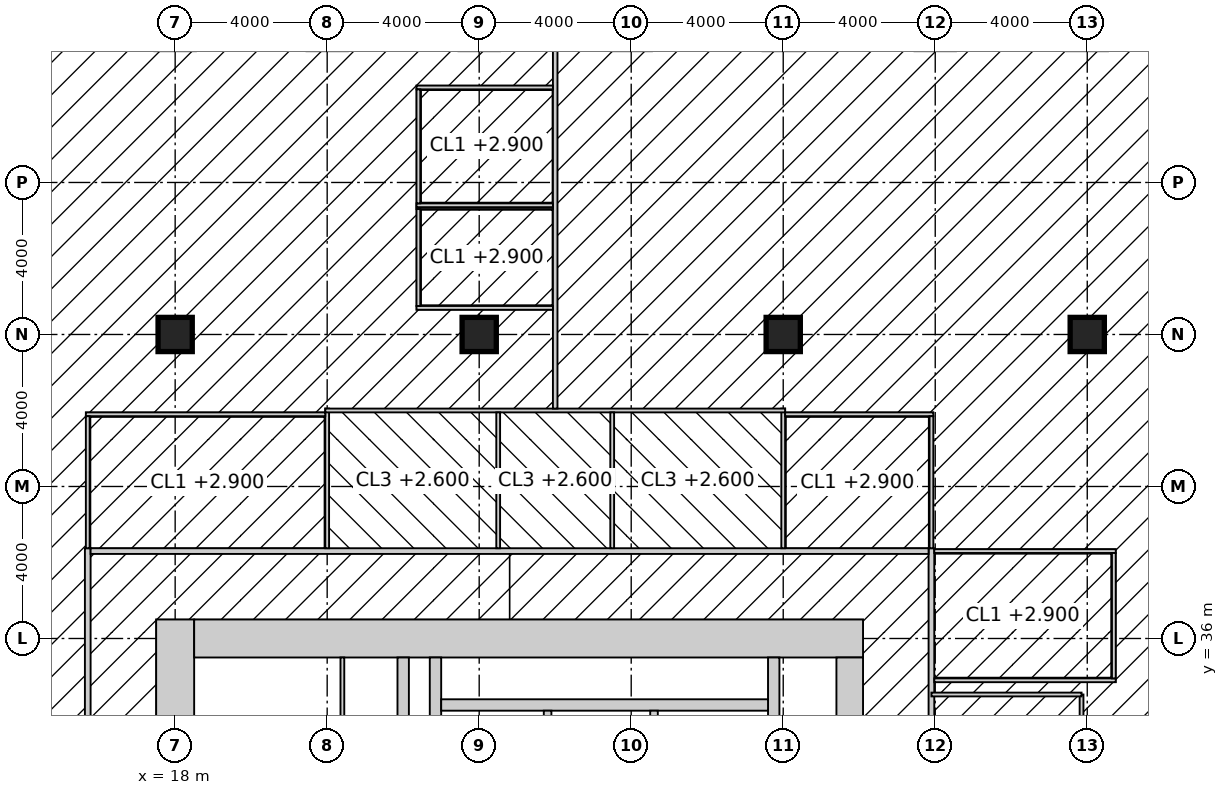
"""IFC4 building model, lengths in metres.
Left out: names, types, materials, properties, quantities, classifications, styles, units other than length and angle.
Written with IfcOpenShell. Run it as: python <this file> out.ifc"""

import sys

from ifc_helpers import new_model, si_unit, direction, frame, frame_2d, origin, origin_2d, place, context, subcontext, project, spatial, rectangle, hollow_rectangle, extrude, element, fill, save


model = new_model("IFC4")
c1 = context("Model", 3, precision=1e-05, world=origin(), true_north=direction((0.0, 1.0)))
c2 = subcontext(c1, "Body", "Model", "MODEL_VIEW")
j1 = project(units=[si_unit("LENGTHUNIT", "METRE"), si_unit("PLANEANGLEUNIT", "RADIAN")], contexts=[c1])
p1 = place(None, origin())
s1 = spatial("IfcSite", under=j1, at=p1, CompositionType="ELEMENT")
p2 = place(p1, origin())
s2 = spatial("IfcBuilding", under=s1, at=p2, CompositionType="ELEMENT")
p3 = place(p2, frame((0.0, 0.0, 121.4)))
s3 = spatial("IfcBuildingStorey", under=s2, at=p3, CompositionType="ELEMENT", Elevation=121.4)
for number, where, z_axis, x_axis in (
    (1, (18.0, 44.0, 0.0), (0.0, 0.0, 1.0), (1.0, 0.0, 0.0)),
    (2, (26.0, 44.0, 0.0), (0.0, 0.0, 1.0), (1.0, 0.0, 0.0)),
    (3, (34.0, 44.0, 0.0), (0.0, 0.0, 1.0), (1.0, 0.0, 0.0)),
    (4, (42.0, 44.0, 0.0), (0.0, 0.0, 1.0), (1.0, 0.0, 0.0)),
):
    element("IfcColumn", number, at=place(p3, frame(where, z_axis=z_axis, x_axis=x_axis)), inside=s3, PredefinedType="COLUMN", context=c2, shape_type="SweptSolid", body=[
        extrude(hollow_rectangle(XDim=0.9, YDim=0.9, WallThickness=0.1, at=origin_2d()), origin(), (0.0, 0.0, 1.0), 4.0),
    ])
p4 = place(p3, frame((18.0, 17.5, -0.15), z_axis=(0.0, 0.0, 1.0), x_axis=(0.0, 1.0, 0.0)))
e5 = element("IfcWall", 5, at=p4, inside=s3, PredefinedType="SHEAR", context=c2, shape_type="SweptSolid", body=[
    extrude(rectangle(XDim=19.0, YDim=1.0, at=frame_2d((9.5, 0.0))), origin(), (0.0, 0.0, 1.0), 4.0),
])
p5 = place(p3, frame((18.5, 36.0, -0.15), z_axis=(0.0, 0.0, 1.0), x_axis=(1.0, 0.0, 0.0)))
e6 = element("IfcWall", 6, at=p5, inside=s3, PredefinedType="SHEAR", context=c2, shape_type="SweptSolid", body=[
    extrude(rectangle(XDim=17.6, YDim=1.0, at=frame_2d((8.8, 0.0))), origin(), (0.0, 0.0, 1.0), 4.0),
])
p6 = place(p3, frame((35.75, 18.5, -0.15), z_axis=(0.0, 0.0, 1.0), x_axis=(0.0, 1.0, 0.0)))
e7 = element("IfcWall", 7, at=p6, inside=s3, PredefinedType="SHEAR", context=c2, shape_type="SweptSolid", body=[
    extrude(rectangle(XDim=17.0, YDim=0.7, at=frame_2d((8.5, 0.0))), origin(), (0.0, 0.0, 1.0), 4.0),
])
p7 = place(p6, frame((9.85, 0.0, 0.15)))
e8 = element("IfcOpeningElement", 8, at=p7, cuts=e7, PredefinedType="OPENING", context=c2, shape_type="SweptSolid", body=[
    extrude(rectangle(XDim=1.0, YDim=2.2, at=frame_2d((0.5, 1.1))), frame((0.0, 0.36, 0.0), z_axis=(0.0, -1.0, 0.0), x_axis=(1.0, 0.0, 0.0)), (0.0, 0.0, 1.0), 0.72),
])
p8 = place(p3, frame((24.0, 18.5, -0.15), z_axis=(0.0, 0.0, 1.0), x_axis=(0.0, 1.0, 0.0)))
e9 = element("IfcWall", 9, at=p8, inside=s3, PredefinedType="SHEAR", context=c2, shape_type="SweptSolid", body=[
    extrude(rectangle(XDim=17.0, YDim=0.3, at=frame_2d((8.5, 0.0))), origin(), (0.0, 0.0, 1.0), 4.0),
])
p9 = place(p8, frame((9.6, 0.0, 0.15)))
e10 = element("IfcOpeningElement", 10, at=p9, cuts=e9, PredefinedType="OPENING", context=c2, shape_type="SweptSolid", body=[
    extrude(rectangle(XDim=1.5, YDim=2.4, at=frame_2d((0.75, 1.2))), frame((0.0, 0.16, 0.0), z_axis=(0.0, -1.0, 0.0), x_axis=(1.0, 0.0, 0.0)), (0.0, 0.0, 1.0), 0.32),
])
for number, where, z_axis, x_axis in (
    (11, (24.85, 31.3, -0.15), (0.0, 0.0, 1.0), (0.0, 1.0, 0.0)),
    (12, (33.75, 31.3, -0.15), (0.0, 0.0, 1.0), (0.0, 1.0, 0.0)),
):
    element("IfcWall", number, at=place(p3, frame(where, z_axis=z_axis, x_axis=x_axis)), inside=s3, PredefinedType="SHEAR", context=c2, shape_type="SweptSolid", body=[
        extrude(rectangle(XDim=4.2, YDim=0.3, at=frame_2d((2.1, 0.0))), origin(), (0.0, 0.0, 1.0), 4.0),
    ])
p10 = place(p3, frame((25.0, 34.25, -0.15), z_axis=(0.0, 0.0, 1.0), x_axis=(1.0, 0.0, 0.0)))
e13 = element("IfcWall", 13, at=p10, inside=s3, PredefinedType="SHEAR", context=c2, shape_type="SweptSolid", body=[
    extrude(rectangle(XDim=8.6, YDim=0.3, at=frame_2d((4.3, 0.0))), origin(), (0.0, 0.0, 1.0), 4.0),
])
for number, where, z_axis, x_axis in (
    (14, (27.8, 31.3, -0.15), (0.0, 0.0, 1.0), (0.0, 1.0, 0.0)),
    (15, (30.6, 31.3, -0.15), (0.0, 0.0, 1.0), (0.0, 1.0, 0.0)),
):
    element("IfcWall", number, at=place(p3, frame(where, z_axis=z_axis, x_axis=x_axis)), inside=s3, PredefinedType="SOLIDWALL", context=c2, shape_type="SweptSolid", body=[
        extrude(rectangle(XDim=2.8, YDim=0.2, at=frame_2d((1.4, 0.0))), origin(), (0.0, 0.0, 1.0), 4.0),
    ])
p11 = place(p3, frame((22.4, 31.3, 0.0), z_axis=(0.0, 0.0, 1.0), x_axis=(0.0, 1.0, 0.0)))
e16 = element("IfcWall", 16, at=p11, inside=s3, PredefinedType="PARTITIONING", context=c2, shape_type="SweptSolid", body=[
    extrude(rectangle(XDim=4.2, YDim=0.1, at=frame_2d((2.1, 0.0))), origin(), (0.0, 0.0, 1.0), 3.85),
])
p12 = place(p11, frame((1.55, 0.0, 0.0)))
e17 = element("IfcOpeningElement", 17, at=p12, cuts=e16, PredefinedType="OPENING", context=c2, shape_type="SweptSolid", body=[
    extrude(rectangle(XDim=1.0, YDim=2.2, at=frame_2d((0.5, 1.1))), frame((0.0, 0.06, 0.0), z_axis=(0.0, -1.0, 0.0), x_axis=(1.0, 0.0, 0.0)), (0.0, 0.0, 1.0), 0.12),
])
p13 = place(p3, frame((15.7, 15.625, 0.0), z_axis=(0.0, 0.0, 1.0), x_axis=(0.0, 1.0, 0.0)))
e18 = element("IfcWall", 18, at=p13, inside=s3, PredefinedType="PARTITIONING", context=c2, shape_type="SweptSolid", body=[
    extrude(rectangle(XDim=22.75, YDim=0.15, at=frame_2d((11.375, 0.0))), origin(), (0.0, 0.0, 1.0), 3.85),
])
p14 = place(p13, frame((4.974, 0.0, 0.0)))
e19 = element("IfcOpeningElement", 19, at=p14, cuts=e18, PredefinedType="OPENING", context=c2, shape_type="SweptSolid", body=[
    extrude(rectangle(XDim=1.8, YDim=2.4, at=frame_2d((0.9, 1.2))), frame((0.0, 0.085, 0.0), z_axis=(0.0, -1.0, 0.0), x_axis=(1.0, 0.0, 0.0)), (0.0, 0.0, 1.0), 0.17),
])
p15 = place(p13, frame((16.226, 0.0, 0.0)))
e20 = element("IfcOpeningElement", 20, at=p15, cuts=e18, PredefinedType="OPENING", context=c2, shape_type="SweptSolid", body=[
    extrude(rectangle(XDim=1.8, YDim=2.4, at=frame_2d((0.9, 1.2))), frame((0.0, 0.085, 0.0), z_axis=(0.0, -1.0, 0.0), x_axis=(1.0, 0.0, 0.0)), (0.0, 0.0, 1.0), 0.17),
])
p16 = place(p3, frame((37.9, 15.625, 0.0), z_axis=(0.0, 0.0, 1.0), x_axis=(0.0, 1.0, 0.0)))
e21 = element("IfcWall", 21, at=p16, inside=s3, PredefinedType="PARTITIONING", context=c2, shape_type="SweptSolid", body=[
    extrude(rectangle(XDim=22.75, YDim=0.15, at=frame_2d((11.375, 0.0))), origin(), (0.0, 0.0, 1.0), 2.95),
])
p17 = place(p16, frame((4.974, 0.0, 0.0)))
e22 = element("IfcOpeningElement", 22, at=p17, cuts=e21, PredefinedType="OPENING", context=c2, shape_type="SweptSolid", body=[
    extrude(rectangle(XDim=1.8, YDim=2.4, at=frame_2d((0.9, 1.2))), frame((0.0, 0.085, 0.0), z_axis=(0.0, -1.0, 0.0), x_axis=(1.0, 0.0, 0.0)), (0.0, 0.0, 1.0), 0.17),
])
p18 = place(p16, frame((16.226, 0.0, 0.0)))
e23 = element("IfcOpeningElement", 23, at=p18, cuts=e21, PredefinedType="OPENING", context=c2, shape_type="SweptSolid", body=[
    extrude(rectangle(XDim=1.8, YDim=2.4, at=frame_2d((0.9, 1.2))), frame((0.0, 0.085, 0.0), z_axis=(0.0, -1.0, 0.0), x_axis=(1.0, 0.0, 0.0)), (0.0, 0.0, 1.0), 0.17),
])
p19 = place(p3, frame((15.775, 38.3, 0.0), z_axis=(0.0, 0.0, 1.0), x_axis=(1.0, 0.0, 0.0)))
e24 = element("IfcWall", 24, at=p19, inside=s3, PredefinedType="PARTITIONING", context=c2, shape_type="SweptSolid", body=[
    extrude(rectangle(XDim=22.05, YDim=0.15, at=frame_2d((11.025, 0.0))), origin(), (0.0, 0.0, 1.0), 3.85),
])
p20 = place(p19, frame((7.975, 0.0, 0.0)))
e25 = element("IfcOpeningElement", 25, at=p20, cuts=e24, PredefinedType="OPENING", context=c2, shape_type="SweptSolid", body=[
    extrude(rectangle(XDim=0.9, YDim=2.1, at=frame_2d((0.45, 1.05))), frame((0.0, 0.085, 0.0), z_axis=(0.0, -1.0, 0.0), x_axis=(1.0, 0.0, 0.0)), (0.0, 0.0, 1.0), 0.17),
])
p21 = place(p19, frame((11.725, 0.0, 0.0)))
e26 = element("IfcOpeningElement", 26, at=p21, cuts=e24, PredefinedType="OPENING", context=c2, shape_type="SweptSolid", body=[
    extrude(rectangle(XDim=1.0, YDim=2.1, at=frame_2d((0.5, 1.05))), frame((0.0, 0.085, 0.0), z_axis=(0.0, -1.0, 0.0), x_axis=(1.0, 0.0, 0.0)), (0.0, 0.0, 1.0), 0.17),
])
p22 = place(p19, frame((15.575, 0.0, 0.0)))
e27 = element("IfcOpeningElement", 27, at=p22, cuts=e24, PredefinedType="OPENING", context=c2, shape_type="SweptSolid", body=[
    extrude(rectangle(XDim=0.9, YDim=2.1, at=frame_2d((0.45, 1.05))), frame((0.0, 0.085, 0.0), z_axis=(0.0, -1.0, 0.0), x_axis=(1.0, 0.0, 0.0)), (0.0, 0.0, 1.0), 0.17),
])
for number, where, z_axis, x_axis in (
    (28, (22.0, 38.375, 0.0), (0.0, 0.0, 1.0), (0.0, 1.0, 0.0)),
    (29, (34.0, 38.375, 0.0), (0.0, 0.0, 1.0), (0.0, 1.0, 0.0)),
):
    element("IfcWall", number, at=place(p3, frame(where, z_axis=z_axis, x_axis=x_axis)), inside=s3, PredefinedType="PARTITIONING", context=c2, shape_type="SweptSolid", body=[
        extrude(rectangle(XDim=3.675, YDim=0.1, at=frame_2d((1.837, 0.0))), origin(), (0.0, 0.0, 1.0), 2.95),
    ])
p23 = place(p3, frame((21.95, 42.0, 0.0), z_axis=(0.0, 0.0, 1.0), x_axis=(1.0, 0.0, 0.0)))
e30 = element("IfcWall", 30, at=p23, inside=s3, PredefinedType="PARTITIONING", context=c2, shape_type="SweptSolid", body=[
    extrude(rectangle(XDim=12.1, YDim=0.1, at=frame_2d((6.05, 0.0))), origin(), (0.0, 0.0, 1.0), 3.85),
])
for number, where, z_axis, x_axis in (
    (31, (26.5, 38.375, 0.0), (0.0, 0.0, 1.0), (0.0, 1.0, 0.0)),
    (32, (29.5, 38.375, 0.0), (0.0, 0.0, 1.0), (0.0, 1.0, 0.0)),
):
    element("IfcWall", number, at=place(p3, frame(where, z_axis=z_axis, x_axis=x_axis)), inside=s3, PredefinedType="PARTITIONING", context=c2, shape_type="SweptSolid", body=[
        extrude(rectangle(XDim=3.575, YDim=0.1, at=frame_2d((1.788, 0.0))), origin(), (0.0, 0.0, 1.0), 3.85),
    ])
p24 = place(p3, frame((28.0, 42.05, 0.0), z_axis=(0.0, 0.0, 1.0), x_axis=(0.0, 1.0, 0.0)))
e33 = element("IfcWall", 33, at=p24, inside=s3, PredefinedType="PARTITIONING", context=c2, shape_type="SweptSolid", body=[
    extrude(rectangle(XDim=9.65, YDim=0.12, at=frame_2d((4.825, 0.0))), origin(), (0.0, 0.0, 1.0), 3.85),
])
for number, where, z_axis, x_axis in (
    (34, (37.975, 34.9, 0.0), (0.0, 0.0, 1.0), (1.0, 0.0, 0.0)),
    (35, (37.975, 38.3, 0.0), (0.0, 0.0, 1.0), (1.0, 0.0, 0.0)),
):
    element("IfcWall", number, at=place(p3, frame(where, z_axis=z_axis, x_axis=x_axis)), inside=s3, PredefinedType="PARTITIONING", context=c2, shape_type="SweptSolid", body=[
        extrude(rectangle(XDim=4.775, YDim=0.1, at=frame_2d((2.387, 0.0))), origin(), (0.0, 0.0, 1.0), 3.85),
    ])
p25 = place(p3, frame((15.65, 41.9, 0.0), z_axis=(0.0, 0.0, 1.0), x_axis=(1.0, 0.0, 0.0)))
e36 = element("IfcWall", 36, at=p25, inside=s3, PredefinedType="PARTITIONING", context=c2, shape_type="SweptSolid", body=[
    extrude(rectangle(XDim=6.3, YDim=0.1, at=frame_2d((3.15, 0.0))), origin(), (0.0, 0.0, 1.0), 3.85),
])
p26 = place(p25, frame((2.7, 0.0, 0.0)))
e37 = element("IfcOpeningElement", 37, at=p26, cuts=e36, PredefinedType="OPENING", context=c2, shape_type="SweptSolid", body=[
    extrude(rectangle(XDim=1.0, YDim=2.2, at=frame_2d((0.5, 1.1))), frame((0.0, 0.06, 0.0), z_axis=(0.0, -1.0, 0.0), x_axis=(1.0, 0.0, 0.0)), (0.0, 0.0, 1.0), 0.12),
])
p27 = place(p3, frame((34.05, 41.9, 0.0), z_axis=(0.0, 0.0, 1.0), x_axis=(1.0, 0.0, 0.0)))
e38 = element("IfcWall", 38, at=p27, inside=s3, PredefinedType="PARTITIONING", context=c2, shape_type="SweptSolid", body=[
    extrude(rectangle(XDim=3.9, YDim=0.1, at=frame_2d((1.95, 0.0))), origin(), (0.0, 0.0, 1.0), 3.85),
])
p28 = place(p27, frame((1.4, 0.0, 0.0)))
e39 = element("IfcOpeningElement", 39, at=p28, cuts=e38, PredefinedType="OPENING", context=c2, shape_type="SweptSolid", body=[
    extrude(rectangle(XDim=1.0, YDim=2.2, at=frame_2d((0.5, 1.1))), frame((0.0, 0.06, 0.0), z_axis=(0.0, -1.0, 0.0), x_axis=(1.0, 0.0, 0.0)), (0.0, 0.0, 1.0), 0.12),
])
for number, where, z_axis, x_axis in (
    (40, (24.35, 44.7, 0.0), (0.0, 0.0, 1.0), (1.0, 0.0, 0.0)),
    (41, (24.35, 47.35, 0.0), (0.0, 0.0, 1.0), (1.0, 0.0, 0.0)),
    (42, (24.35, 47.4, 0.0), (0.0, 0.0, 1.0), (1.0, 0.0, 0.0)),
    (43, (24.35, 50.5, 0.0), (0.0, 0.0, 1.0), (1.0, 0.0, 0.0)),
):
    element("IfcWall", number, at=place(p3, frame(where, z_axis=z_axis, x_axis=x_axis)), inside=s3, PredefinedType="PARTITIONING", context=c2, shape_type="SweptSolid", body=[
        extrude(rectangle(XDim=3.59, YDim=0.1, at=frame_2d((1.795, 0.0))), origin(), (0.0, 0.0, 1.0), 3.85),
    ])
p29 = place(p3, frame((15.7, 38.375, 0.0), z_axis=(0.0, 0.0, 1.0), x_axis=(0.0, 1.0, 0.0)))
e44 = element("IfcWall", 44, at=p29, inside=s3, PredefinedType="PARTITIONING", context=c2, shape_type="SweptSolid", body=[
    extrude(rectangle(XDim=3.475, YDim=0.1, at=frame_2d((1.738, 0.0))), origin(), (0.0, 0.0, 1.0), 3.85),
])
p30 = place(p3, frame((24.4, 44.75, 0.0), z_axis=(0.0, 0.0, 1.0), x_axis=(0.0, 1.0, 0.0)))
e45 = element("IfcWall", 45, at=p30, inside=s3, PredefinedType="PARTITIONING", context=c2, shape_type="SweptSolid", body=[
    extrude(rectangle(XDim=2.55, YDim=0.1, at=frame_2d((1.275, 0.0))), origin(), (0.0, 0.0, 1.0), 3.85),
])
p31 = place(p30, frame((0.775, 0.0, 0.0)))
e46 = element("IfcOpeningElement", 46, at=p31, cuts=e45, PredefinedType="OPENING", context=c2, shape_type="SweptSolid", body=[
    extrude(rectangle(XDim=1.0, YDim=2.2, at=frame_2d((0.5, 1.1))), frame((0.0, 0.06, 0.0), z_axis=(0.0, -1.0, 0.0), x_axis=(1.0, 0.0, 0.0)), (0.0, 0.0, 1.0), 0.12),
])
p32 = place(p3, frame((24.4, 47.45, 0.0), z_axis=(0.0, 0.0, 1.0), x_axis=(0.0, 1.0, 0.0)))
e47 = element("IfcWall", 47, at=p32, inside=s3, PredefinedType="PARTITIONING", context=c2, shape_type="SweptSolid", body=[
    extrude(rectangle(XDim=3.0, YDim=0.1, at=frame_2d((1.5, 0.0))), origin(), (0.0, 0.0, 1.0), 3.85),
])
p33 = place(p32, frame((1.0, 0.0, 0.0)))
e48 = element("IfcOpeningElement", 48, at=p33, cuts=e47, PredefinedType="OPENING", context=c2, shape_type="SweptSolid", body=[
    extrude(rectangle(XDim=1.0, YDim=2.2, at=frame_2d((0.5, 1.1))), frame((0.0, 0.06, 0.0), z_axis=(0.0, -1.0, 0.0), x_axis=(1.0, 0.0, 0.0)), (0.0, 0.0, 1.0), 0.12),
])
p34 = place(p3, frame((37.9, 38.375, 0.0), z_axis=(0.0, 0.0, 1.0), x_axis=(0.0, 1.0, 0.0)))
e49 = element("IfcWall", 49, at=p34, inside=s3, PredefinedType="PARTITIONING", context=c2, shape_type="SweptSolid", body=[
    extrude(rectangle(XDim=3.475, YDim=0.1, at=frame_2d((1.738, 0.0))), origin(), (0.0, 0.0, 1.0), 2.95),
])
p35 = place(p3, frame((42.7, 34.95, 0.0), z_axis=(0.0, 0.0, 1.0), x_axis=(0.0, 1.0, 0.0)))
e50 = element("IfcWall", 50, at=p35, inside=s3, PredefinedType="PARTITIONING", context=c2, shape_type="SweptSolid", body=[
    extrude(rectangle(XDim=3.3, YDim=0.1, at=frame_2d((1.65, 0.0))), origin(), (0.0, 0.0, 1.0), 3.85),
])
p36 = place(p35, frame((1.15, 0.0, 0.0)))
e51 = element("IfcOpeningElement", 51, at=p36, cuts=e50, PredefinedType="OPENING", context=c2, shape_type="SweptSolid", body=[
    extrude(rectangle(XDim=1.0, YDim=2.2, at=frame_2d((0.5, 1.1))), frame((0.0, 0.06, 0.0), z_axis=(0.0, -1.0, 0.0), x_axis=(1.0, 0.0, 0.0)), (0.0, 0.0, 1.0), 0.12),
])
p37 = place(p3, frame((41.85, 30.376, 0.0), z_axis=(0.0, 0.0, 1.0), x_axis=(0.0, 1.0, 0.0)))
e52 = element("IfcWall", 52, at=p37, inside=s3, PredefinedType="PARTITIONING", context=c2, shape_type="SweptSolid", body=[
    extrude(rectangle(XDim=4.15, YDim=0.1, at=frame_2d((2.075, 0.0))), origin(), (0.0, 0.0, 1.0), 3.85),
])
p38 = place(p37, frame((1.575, 0.0, 0.0)))
e53 = element("IfcOpeningElement", 53, at=p38, cuts=e52, PredefinedType="OPENING", context=c2, shape_type="SweptSolid", body=[
    extrude(rectangle(XDim=1.0, YDim=2.2, at=frame_2d((0.5, 1.1))), frame((0.0, 0.06, 0.0), z_axis=(0.0, -1.0, 0.0), x_axis=(1.0, 0.0, 0.0)), (0.0, 0.0, 1.0), 0.12),
])
p39 = place(p3, frame((41.85, 34.526, 0.0), z_axis=(0.0, 0.0, 1.0), x_axis=(-1.0, 0.0, 0.0)))
e54 = element("IfcWall", 54, at=p39, inside=s3, PredefinedType="PARTITIONING", context=c2, shape_type="SweptSolid", body=[
    extrude(rectangle(XDim=3.95, YDim=0.1, at=frame_2d((1.975, 0.0))), origin(), (0.0, 0.0, 1.0), 3.85),
])
p40 = place(p20, origin())
e55 = element("IfcDoor", 55, at=p40, inside=s3, OperationType="SINGLE_SWING_LEFT", PredefinedType="DOOR", context=c2, shape_type="SweptSolid", body=[
    extrude(rectangle(XDim=0.9, YDim=2.1, at=frame_2d((0.45, 1.05))), frame((0.0, 0.025, 0.0), z_axis=(0.0, -1.0, 0.0), x_axis=(1.0, 0.0, 0.0)), (0.0, 0.0, 1.0), 0.05),
])
fill(e25, e55)
p41 = place(p21, origin())
e56 = element("IfcDoor", 56, at=p41, inside=s3, OperationType="SLIDING_TO_LEFT", PredefinedType="DOOR", context=c2, shape_type="SweptSolid", body=[
    extrude(rectangle(XDim=1.0, YDim=2.1, at=frame_2d((0.5, 1.05))), frame((0.0, 0.025, 0.0), z_axis=(0.0, -1.0, 0.0), x_axis=(1.0, 0.0, 0.0)), (0.0, 0.0, 1.0), 0.05),
])
fill(e26, e56)
p42 = place(p22, origin())
e57 = element("IfcDoor", 57, at=p42, inside=s3, OperationType="SINGLE_SWING_LEFT", PredefinedType="DOOR", context=c2, shape_type="SweptSolid", body=[
    extrude(rectangle(XDim=0.9, YDim=2.1, at=frame_2d((0.45, 1.05))), frame((0.0, 0.025, 0.0), z_axis=(0.0, -1.0, 0.0), x_axis=(1.0, 0.0, 0.0)), (0.0, 0.0, 1.0), 0.05),
])
fill(e27, e57)
p43 = place(p26, origin())
e58 = element("IfcDoor", 58, at=p43, inside=s3, OperationType="SINGLE_SWING_RIGHT", PredefinedType="DOOR", context=c2, shape_type="SweptSolid", body=[
    extrude(rectangle(XDim=1.0, YDim=2.2, at=frame_2d((0.5, 1.1))), frame((0.0, 0.025, 0.0), z_axis=(0.0, -1.0, 0.0), x_axis=(1.0, 0.0, 0.0)), (0.0, 0.0, 1.0), 0.05),
])
fill(e37, e58)
p44 = place(p28, origin())
e59 = element("IfcDoor", 59, at=p44, inside=s3, OperationType="SINGLE_SWING_RIGHT", PredefinedType="DOOR", context=c2, shape_type="SweptSolid", body=[
    extrude(rectangle(XDim=1.0, YDim=2.2, at=frame_2d((0.5, 1.1))), frame((0.0, 0.025, 0.0), z_axis=(0.0, -1.0, 0.0), x_axis=(1.0, 0.0, 0.0)), (0.0, 0.0, 1.0), 0.05),
])
fill(e39, e59)
p45 = place(p31, origin())
e60 = element("IfcDoor", 60, at=p45, inside=s3, OperationType="SINGLE_SWING_LEFT", PredefinedType="DOOR", context=c2, shape_type="SweptSolid", body=[
    extrude(rectangle(XDim=1.0, YDim=2.2, at=frame_2d((0.5, 1.1))), frame((0.0, 0.025, 0.0), z_axis=(0.0, -1.0, 0.0), x_axis=(1.0, 0.0, 0.0)), (0.0, 0.0, 1.0), 0.05),
])
fill(e46, e60)
p46 = place(p33, origin())
e61 = element("IfcDoor", 61, at=p46, inside=s3, OperationType="SINGLE_SWING_LEFT", PredefinedType="DOOR", context=c2, shape_type="SweptSolid", body=[
    extrude(rectangle(XDim=1.0, YDim=2.2, at=frame_2d((0.5, 1.1))), frame((0.0, 0.025, 0.0), z_axis=(0.0, -1.0, 0.0), x_axis=(1.0, 0.0, 0.0)), (0.0, 0.0, 1.0), 0.05),
])
fill(e48, e61)
p47 = place(p36, origin())
e62 = element("IfcDoor", 62, at=p47, inside=s3, OperationType="SINGLE_SWING_LEFT", PredefinedType="DOOR", context=c2, shape_type="SweptSolid", body=[
    extrude(rectangle(XDim=1.0, YDim=2.2, at=frame_2d((0.5, 1.1))), frame((0.0, 0.025, 0.0), z_axis=(0.0, -1.0, 0.0), x_axis=(1.0, 0.0, 0.0)), (0.0, 0.0, 1.0), 0.05),
])
fill(e51, e62)
save(model, sys.argv[1])
